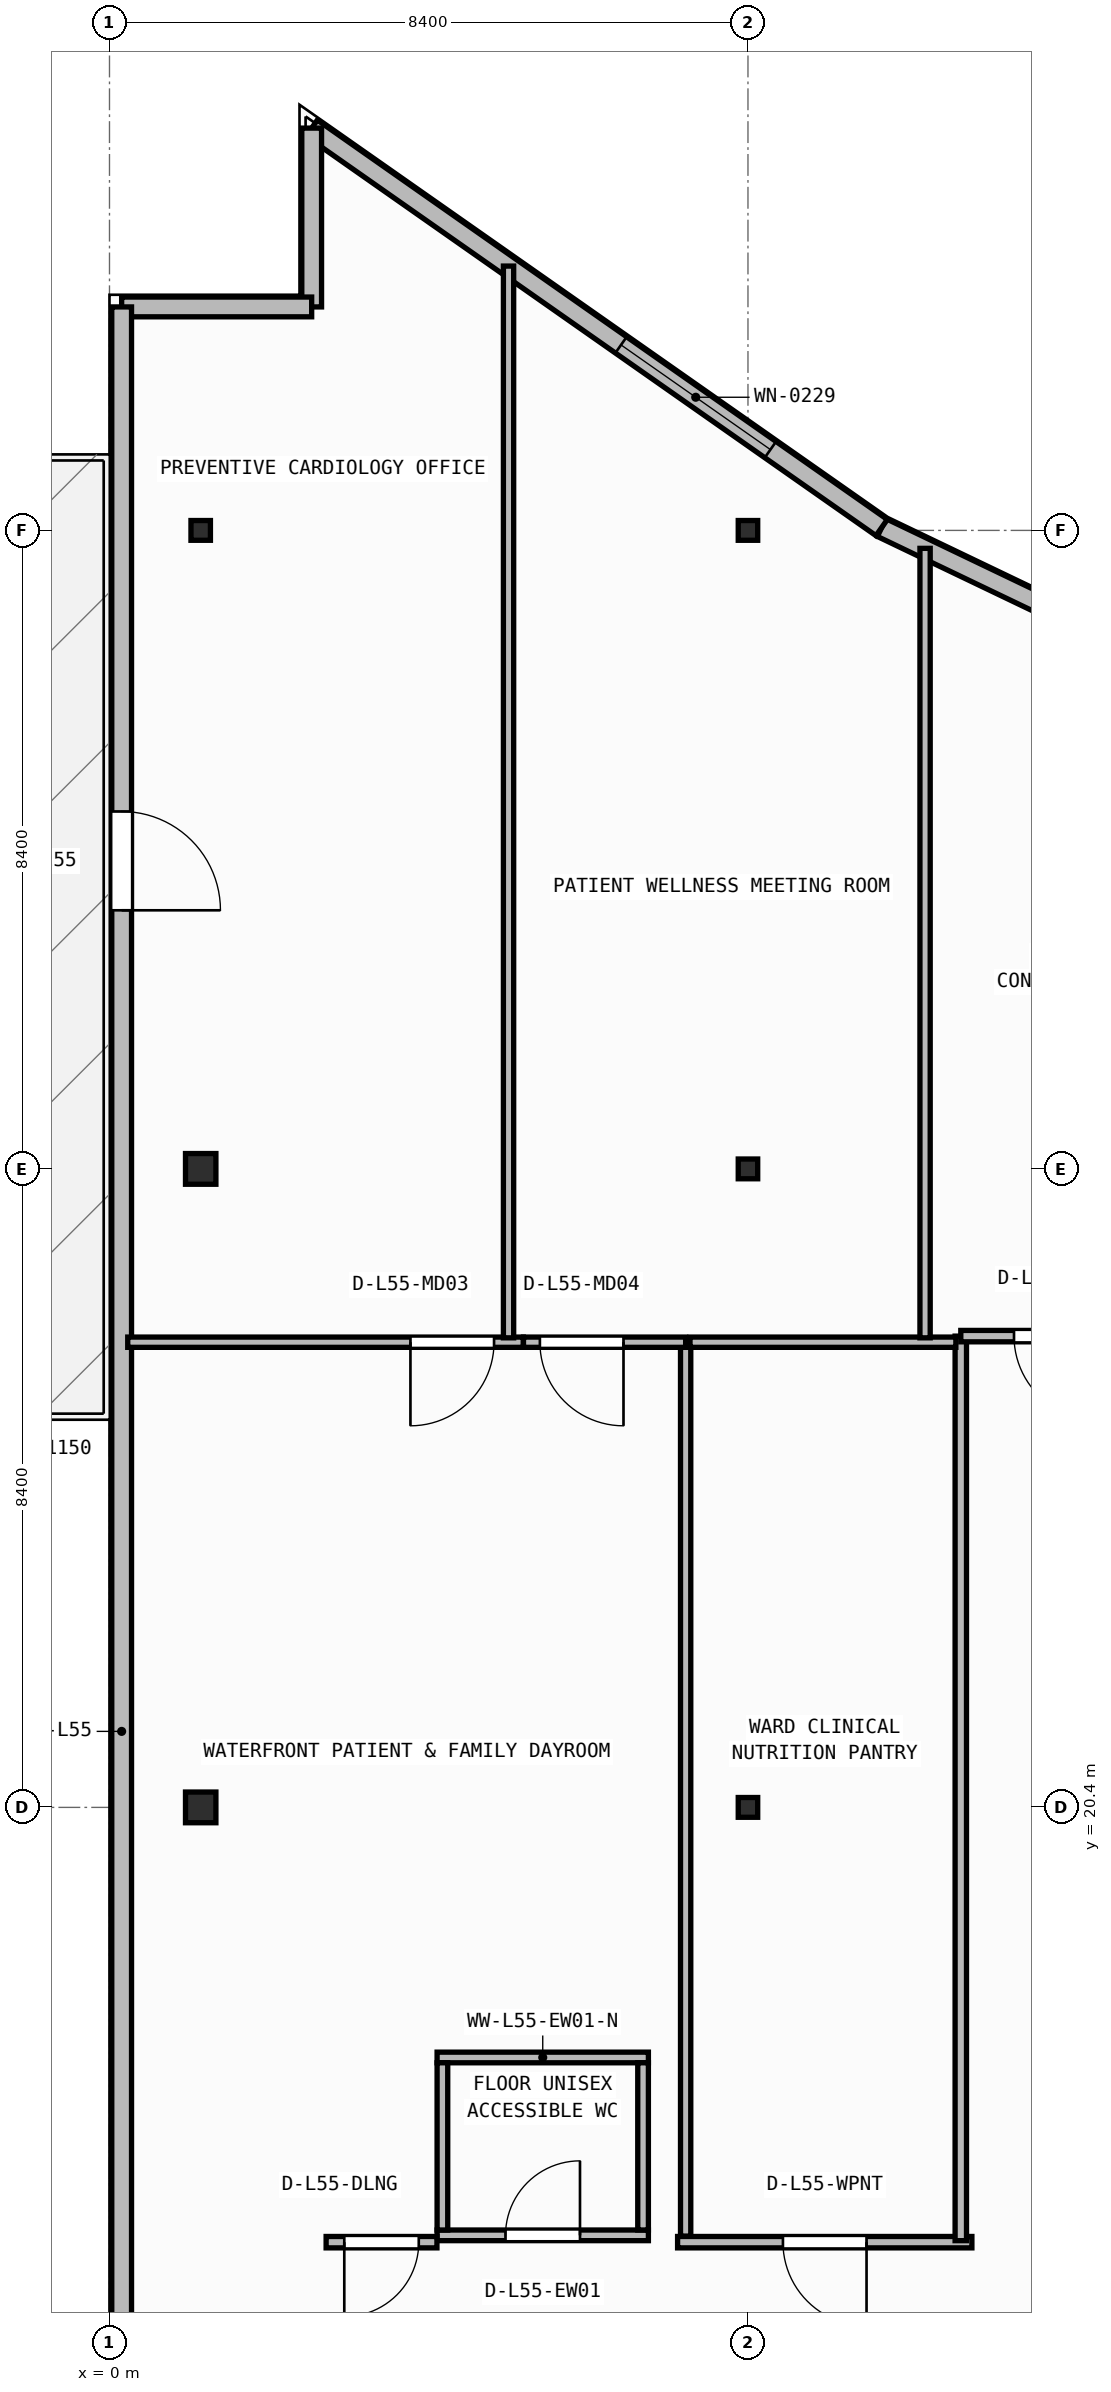
"""IFC4 building model, lengths in metres.
Left out: names, types, materials, properties, quantities, classifications, styles, units other than length and angle.
Written with IfcOpenShell. Run it as: python <this file> out.ifc"""

import sys

from ifc_helpers import new_model, si_unit, direction, frame, frame_2d, origin, origin_2d, place, context, subcontext, project, spatial, rectangle, i_section, extrude, element, fill, save


model = new_model("IFC4")
c1 = context("Model", 3, precision=1e-05, world=origin(), true_north=direction((0.0, 1.0)))
c2 = subcontext(c1, "Body", "Model", "MODEL_VIEW")
j1 = project(units=[si_unit("LENGTHUNIT", "METRE"), si_unit("PLANEANGLEUNIT", "RADIAN")], contexts=[c1])
p1 = place(None, origin())
s1 = spatial("IfcSite", under=j1, at=p1, CompositionType="ELEMENT")
p2 = place(p1, origin())
s2 = spatial("IfcBuilding", under=s1, at=p2, CompositionType="ELEMENT")
p3 = place(p2, frame((0.0, 0.0, 223.7)))
s3 = spatial("IfcBuildingStorey", under=s2, at=p3, CompositionType="ELEMENT", Elevation=223.7)
p4 = place(p3, frame((1.2, 20.4, 0.0), z_axis=(0.0, 0.0, 1.0), x_axis=(1.0, 0.0, 0.0)))
e1 = element("IfcColumn", 1, at=p4, inside=s3, PredefinedType="COLUMN", context=c2, shape_type="SweptSolid", body=[
    extrude(i_section(OverallWidth=0.4, OverallDepth=0.404, WebThickness=0.02, FlangeThickness=0.032, at=origin_2d()), origin(), (0.0, 0.0, 1.0), 3.95),
])
p5 = place(p3, frame((8.4, 20.4, 0.0), z_axis=(0.0, 0.0, 1.0), x_axis=(1.0, 0.0, 0.0)))
e2 = element("IfcColumn", 2, at=p5, inside=s3, PredefinedType="COLUMN", context=c2, shape_type="SweptSolid", body=[
    extrude(i_section(OverallWidth=0.256, OverallDepth=0.26, WebThickness=0.01, FlangeThickness=0.017, FilletRadius=0.013, at=origin_2d()), origin(), (0.0, 0.0, 1.0), 3.95),
])
p6 = place(p3, frame((1.2, 28.8, 0.0), z_axis=(0.0, 0.0, 1.0), x_axis=(1.0, 0.0, 0.0)))
e3 = element("IfcColumn", 3, at=p6, inside=s3, PredefinedType="COLUMN", context=c2, shape_type="SweptSolid", body=[
    extrude(i_section(OverallWidth=0.4, OverallDepth=0.404, WebThickness=0.02, FlangeThickness=0.032, at=origin_2d()), origin(), (0.0, 0.0, 1.0), 3.95),
])
for number, where, z_axis, x_axis in (
    (4, (8.4, 28.8, 0.0), (0.0, 0.0, 1.0), (1.0, 0.0, 0.0)),
    (5, (1.2, 37.2, 0.0), (0.0, 0.0, 1.0), (1.0, 0.0, 0.0)),
    (6, (8.4, 37.2, 0.0), (0.0, 0.0, 1.0), (1.0, 0.0, 0.0)),
):
    element("IfcColumn", number, at=place(p3, frame(where, z_axis=z_axis, x_axis=x_axis)), inside=s3, PredefinedType="COLUMN", context=c2, shape_type="SweptSolid", body=[
        extrude(i_section(OverallWidth=0.256, OverallDepth=0.26, WebThickness=0.01, FlangeThickness=0.017, FilletRadius=0.013, at=origin_2d()), origin(), (0.0, 0.0, 1.0), 3.95),
    ])
p7 = place(p3, frame((21.461, 31.823, 0.0), z_axis=(0.0, 0.0, 1.0), x_axis=(-0.901858094827, 0.432032379336, 0.0)))
e7 = element("IfcWall", 7, at=p7, inside=s3, PredefinedType="STANDARD", context=c2, shape_type="SweptSolid", body=[
    extrude(rectangle(XDim=12.532, YDim=0.26, at=frame_2d((6.266, 0.0))), origin(), (0.0, 0.0, 1.0), 3.71),
])
p8 = place(p7, frame((2.71, 0.0, 0.9)))
e8 = element("IfcOpeningElement", 8, at=p8, cuts=e7, PredefinedType="OPENING", context=c2, shape_type="SweptSolid", body=[
    extrude(rectangle(XDim=2.4, YDim=1.65, at=frame_2d((1.2, 0.825))), frame((0.0, 0.14, 0.0), z_axis=(0.0, -1.0, 0.0), x_axis=(1.0, 0.0, 0.0)), (0.0, 0.0, 1.0), 0.28),
])
p9 = place(p3, frame((10.159, 37.237, 0.0), z_axis=(0.0, 0.0, 1.0), x_axis=(-0.818933702389, 0.57388813465, 0.0)))
e9 = element("IfcWall", 9, at=p9, inside=s3, PredefinedType="STANDARD", context=c2, shape_type="SweptSolid", body=[
    extrude(rectangle(XDim=9.157, YDim=0.26, at=frame_2d((4.579, 0.0))), origin(), (0.0, 0.0, 1.0), 3.71),
])
p10 = place(p9, frame((1.787, 0.0, 0.9)))
e10 = element("IfcOpeningElement", 10, at=p10, cuts=e9, PredefinedType="OPENING", context=c2, shape_type="SweptSolid", body=[
    extrude(rectangle(XDim=2.4, YDim=1.65, at=frame_2d((1.2, 0.825))), frame((0.0, 0.14, 0.0), z_axis=(0.0, -1.0, 0.0), x_axis=(1.0, 0.0, 0.0)), (0.0, 0.0, 1.0), 0.28),
])
p11 = place(p3, frame((2.66, 42.492, 0.0), z_axis=(0.0, 0.0, 1.0), x_axis=(0.0, -1.0, 0.0)))
e11 = element("IfcWall", 11, at=p11, inside=s3, PredefinedType="STANDARD", context=c2, shape_type="SweptSolid", body=[
    extrude(rectangle(XDim=2.353, YDim=0.26, at=frame_2d((1.176, 0.0))), origin(), (0.0, 0.0, 1.0), 3.71),
])
p12 = place(p3, frame((2.66, 40.14, 0.0), z_axis=(0.0, 0.0, 1.0), x_axis=(-1.0, 0.0, 0.0)))
e12 = element("IfcWall", 12, at=p12, inside=s3, PredefinedType="STANDARD", context=c2, shape_type="SweptSolid", body=[
    extrude(rectangle(XDim=2.5, YDim=0.26, at=frame_2d((1.25, 0.0))), origin(), (0.0, 0.0, 1.0), 3.71),
])
p13 = place(p3, frame((0.16, 40.14, 0.0), z_axis=(0.0, 0.0, 1.0), x_axis=(0.0, -1.0, 0.0)))
e13 = element("IfcWall", 13, at=p13, inside=s3, PredefinedType="STANDARD", context=c2, shape_type="SweptSolid", body=[
    extrude(rectangle(XDim=37.48, YDim=0.26, at=frame_2d((18.74, 0.0))), origin(), (0.0, 0.0, 1.0), 3.71),
])
p14 = place(p13, frame((6.638, 0.0, 0.0)))
e14 = element("IfcOpeningElement", 14, at=p14, cuts=e13, PredefinedType="OPENING", context=c2, shape_type="SweptSolid", body=[
    extrude(rectangle(XDim=1.3, YDim=2.15, at=frame_2d((0.65, 1.075))), frame((0.0, 0.14, 0.0), z_axis=(0.0, -1.0, 0.0), x_axis=(1.0, 0.0, 0.0)), (0.0, 0.0, 1.0), 0.28),
])
p15 = place(p3, frame((4.31, 14.77, 0.0), z_axis=(0.0, 0.0, 1.0), x_axis=(1.0, 0.0, 0.0)))
e15 = element("IfcWall", 15, at=p15, inside=s3, PredefinedType="PARTITIONING", context=c2, shape_type="SweptSolid", body=[
    extrude(rectangle(XDim=2.78, YDim=0.14, at=frame_2d((1.39, 0.0))), origin(), (0.0, 0.0, 1.0), 3.71),
])
p16 = place(p15, frame((0.9, 0.0, 0.0)))
e16 = element("IfcOpeningElement", 16, at=p16, cuts=e15, PredefinedType="OPENING", context=c2, shape_type="SweptSolid", body=[
    extrude(rectangle(XDim=0.98, YDim=2.1, at=frame_2d((0.49, 1.05))), frame((0.0, 0.08, 0.0), z_axis=(0.0, -1.0, 0.0), x_axis=(1.0, 0.0, 0.0)), (0.0, 0.0, 1.0), 0.16),
])
p17 = place(p3, frame((4.31, 17.11, 0.0), z_axis=(0.0, 0.0, 1.0), x_axis=(1.0, 0.0, 0.0)))
e17 = element("IfcWall", 17, at=p17, inside=s3, PredefinedType="PARTITIONING", context=c2, shape_type="SweptSolid", body=[
    extrude(rectangle(XDim=2.78, YDim=0.14, at=frame_2d((1.39, 0.0))), origin(), (0.0, 0.0, 1.0), 3.71),
])
for number, where, z_axis, x_axis in (
    (18, (4.38, 14.84, 0.0), (0.0, 0.0, 1.0), (0.0, 1.0, 0.0)),
    (19, (7.02, 14.84, 0.0), (0.0, 0.0, 1.0), (0.0, 1.0, 0.0)),
):
    element("IfcWall", number, at=place(p3, frame(where, z_axis=z_axis, x_axis=x_axis)), inside=s3, PredefinedType="PARTITIONING", context=c2, shape_type="SweptSolid", body=[
        extrude(rectangle(XDim=2.2, YDim=0.14, at=frame_2d((1.1, 0.0))), origin(), (0.0, 0.0, 1.0), 3.71),
    ])
p18 = place(p3, frame((4.308, 14.68, 0.0), z_axis=(0.0, 0.0, 1.0), x_axis=(-1.0, 0.0, 0.0)))
e20 = element("IfcWall", 20, at=p18, inside=s3, PredefinedType="PARTITIONING", context=c2, shape_type="SweptSolid", body=[
    extrude(rectangle(XDim=1.458, YDim=0.15, at=frame_2d((0.729, 0.0))), origin(), (0.0, 0.0, 1.0), 3.71),
])
p19 = place(p18, frame((0.239, 0.0, 0.0)))
e21 = element("IfcOpeningElement", 21, at=p19, cuts=e20, PredefinedType="OPENING", context=c2, shape_type="SweptSolid", body=[
    extrude(rectangle(XDim=0.98, YDim=2.1, at=frame_2d((0.49, 1.05))), frame((0.0, 0.085, 0.0), z_axis=(0.0, -1.0, 0.0), x_axis=(1.0, 0.0, 0.0)), (0.0, 0.0, 1.0), 0.17),
])
p20 = place(p3, frame((11.346, 14.68, 0.0), z_axis=(0.0, 0.0, 1.0), x_axis=(-1.0, 0.0, 0.0)))
e22 = element("IfcWall", 22, at=p20, inside=s3, PredefinedType="PARTITIONING", context=c2, shape_type="SweptSolid", body=[
    extrude(rectangle(XDim=3.872, YDim=0.15, at=frame_2d((1.936, 0.0))), origin(), (0.0, 0.0, 1.0), 3.71),
])
p21 = place(p20, frame((1.386, 0.0, 0.0)))
e23 = element("IfcOpeningElement", 23, at=p21, cuts=e22, PredefinedType="OPENING", context=c2, shape_type="SweptSolid", body=[
    extrude(rectangle(XDim=1.1, YDim=2.1, at=frame_2d((0.55, 1.05))), frame((0.0, 0.085, 0.0), z_axis=(0.0, -1.0, 0.0), x_axis=(1.0, 0.0, 0.0)), (0.0, 0.0, 1.0), 0.17),
])
p22 = place(p3, frame((11.2, 26.6, 0.0), z_axis=(0.0, 0.0, 1.0), x_axis=(0.0, -1.0, 0.0)))
e24 = element("IfcWall", 24, at=p22, inside=s3, PredefinedType="PARTITIONING", context=c2, shape_type="SweptSolid", body=[
    extrude(rectangle(XDim=11.9, YDim=0.15, at=frame_2d((5.95, 0.0))), origin(), (0.0, 0.0, 1.0), 3.71),
])
p23 = place(p3, frame((13.7, 26.6, 0.0), z_axis=(0.0, 0.0, 1.0), x_axis=(-1.0, 0.0, 0.0)))
e25 = element("IfcWall", 25, at=p23, inside=s3, PredefinedType="PARTITIONING", context=c2, shape_type="SweptSolid", body=[
    extrude(rectangle(XDim=2.5, YDim=0.15, at=frame_2d((1.25, 0.0))), origin(), (0.0, 0.0, 1.0), 3.71),
])
p24 = place(p23, frame((0.7, 0.0, 0.0)))
e26 = element("IfcOpeningElement", 26, at=p24, cuts=e25, PredefinedType="OPENING", context=c2, shape_type="SweptSolid", body=[
    extrude(rectangle(XDim=1.1, YDim=2.1, at=frame_2d((0.55, 1.05))), frame((0.0, 0.085, 0.0), z_axis=(0.0, -1.0, 0.0), x_axis=(1.0, 0.0, 0.0)), (0.0, 0.0, 1.0), 0.17),
])
p25 = place(p3, frame((7.58, 14.76, 0.0), z_axis=(0.0, 0.0, 1.0), x_axis=(0.0, 1.0, 0.0)))
e27 = element("IfcWall", 27, at=p25, inside=s3, PredefinedType="PARTITIONING", context=c2, shape_type="SweptSolid", body=[
    extrude(rectangle(XDim=11.76, YDim=0.135, at=frame_2d((5.88, 0.0))), origin(), (0.0, 0.0, 1.0), 3.71),
])
p26 = place(p3, frame((5.445, 26.52, 0.0), z_axis=(0.0, 0.0, 1.0), x_axis=(-1.0, 0.0, 0.0)))
e28 = element("IfcWall", 28, at=p26, inside=s3, PredefinedType="PARTITIONING", context=c2, shape_type="SweptSolid", body=[
    extrude(rectangle(XDim=5.205, YDim=0.135, at=frame_2d((2.602, 0.0))), origin(), (0.0, 0.0, 1.0), 3.71),
])
p27 = place(p26, frame((0.385, 0.0, 0.0)))
e29 = element("IfcOpeningElement", 29, at=p27, cuts=e28, PredefinedType="OPENING", context=c2, shape_type="SweptSolid", body=[
    extrude(rectangle(XDim=1.1, YDim=2.1, at=frame_2d((0.55, 1.05))), frame((0.0, 0.077, 0.0), z_axis=(0.0, -1.0, 0.0), x_axis=(1.0, 0.0, 0.0)), (0.0, 0.0, 1.0), 0.155),
])
p28 = place(p3, frame((7.58, 26.52, 0.0), z_axis=(0.0, 0.0, 1.0), x_axis=(-1.0, 0.0, 0.0)))
e30 = element("IfcWall", 30, at=p28, inside=s3, PredefinedType="PARTITIONING", context=c2, shape_type="SweptSolid", body=[
    extrude(rectangle(XDim=2.134, YDim=0.135, at=frame_2d((1.067, 0.0))), origin(), (0.0, 0.0, 1.0), 3.71),
])
p29 = place(p28, frame((0.818, 0.0, 0.0)))
e31 = element("IfcOpeningElement", 31, at=p29, cuts=e30, PredefinedType="OPENING", context=c2, shape_type="SweptSolid", body=[
    extrude(rectangle(XDim=1.1, YDim=2.1, at=frame_2d((0.55, 1.05))), frame((0.0, 0.077, 0.0), z_axis=(0.0, -1.0, 0.0), x_axis=(1.0, 0.0, 0.0)), (0.0, 0.0, 1.0), 0.155),
])
p30 = place(p3, frame((11.135, 26.52, 0.0), z_axis=(0.0, 0.0, 1.0), x_axis=(-1.0, 0.0, 0.0)))
e32 = element("IfcWall", 32, at=p30, inside=s3, PredefinedType="PARTITIONING", context=c2, shape_type="SweptSolid", body=[
    extrude(rectangle(XDim=3.498, YDim=0.135, at=frame_2d((1.749, 0.0))), origin(), (0.0, 0.0, 1.0), 3.71),
])
p31 = place(p3, frame((5.25, 26.577, 0.0), z_axis=(0.0, 0.0, 1.0), x_axis=(0.0, 1.0, 0.0)))
e33 = element("IfcWall", 33, at=p31, inside=s3, PredefinedType="PARTITIONING", context=c2, shape_type="SweptSolid", body=[
    extrude(rectangle(XDim=14.1, YDim=0.135, at=frame_2d((7.05, 0.0))), origin(), (0.0, 0.0, 1.0), 3.71),
])
p32 = place(p3, frame((10.73, 26.577, 0.0), z_axis=(0.0, 0.0, 1.0), x_axis=(0.0, 1.0, 0.0)))
e34 = element("IfcWall", 34, at=p32, inside=s3, PredefinedType="PARTITIONING", context=c2, shape_type="SweptSolid", body=[
    extrude(rectangle(XDim=10.386, YDim=0.135, at=frame_2d((5.193, 0.0))), origin(), (0.0, 0.0, 1.0), 3.71),
])
p33 = place(p10, origin())
e35 = element("IfcWindow", 35, at=p33, inside=s3, PartitioningType="SINGLE_PANEL", PredefinedType="WINDOW", context=c2, shape_type="SweptSolid", body=[
    extrude(rectangle(XDim=2.4, YDim=1.65, at=frame_2d((1.2, 0.825))), frame((0.0, 0.03, 0.0), z_axis=(0.0, -1.0, 0.0), x_axis=(1.0, 0.0, 0.0)), (0.0, 0.0, 1.0), 0.06),
])
fill(e10, e35)
p34 = place(p14, origin())
e36 = element("IfcDoor", 36, at=p34, inside=s3, OperationType="SINGLE_SWING_RIGHT", PredefinedType="DOOR", context=c2, shape_type="SweptSolid", body=[
    extrude(rectangle(XDim=1.3, YDim=2.15, at=frame_2d((0.65, 1.075))), frame((0.0, 0.025, 0.0), z_axis=(0.0, -1.0, 0.0), x_axis=(1.0, 0.0, 0.0)), (0.0, 0.0, 1.0), 0.05),
])
fill(e14, e36)
p35 = place(p16, origin())
e37 = element("IfcDoor", 37, at=p35, inside=s3, OperationType="SINGLE_SWING_RIGHT", PredefinedType="DOOR", context=c2, shape_type="SweptSolid", body=[
    extrude(rectangle(XDim=0.98, YDim=2.1, at=frame_2d((0.49, 1.05))), frame((0.0, 0.025, 0.0), z_axis=(0.0, -1.0, 0.0), x_axis=(1.0, 0.0, 0.0)), (0.0, 0.0, 1.0), 0.05),
])
fill(e16, e37)
p36 = place(p19, origin())
e38 = element("IfcDoor", 38, at=p36, inside=s3, OperationType="SINGLE_SWING_RIGHT", PredefinedType="DOOR", context=c2, shape_type="SweptSolid", body=[
    extrude(rectangle(XDim=0.98, YDim=2.1, at=frame_2d((0.49, 1.05))), frame((0.0, 0.025, 0.0), z_axis=(0.0, -1.0, 0.0), x_axis=(1.0, 0.0, 0.0)), (0.0, 0.0, 1.0), 0.05),
])
fill(e21, e38)
p37 = place(p21, origin())
e39 = element("IfcDoor", 39, at=p37, inside=s3, OperationType="SINGLE_SWING_LEFT", PredefinedType="DOOR", context=c2, shape_type="SweptSolid", body=[
    extrude(rectangle(XDim=1.1, YDim=2.1, at=frame_2d((0.55, 1.05))), frame((0.0, 0.025, 0.0), z_axis=(0.0, -1.0, 0.0), x_axis=(1.0, 0.0, 0.0)), (0.0, 0.0, 1.0), 0.05),
])
fill(e23, e39)
p38 = place(p24, origin())
e40 = element("IfcDoor", 40, at=p38, inside=s3, OperationType="SINGLE_SWING_LEFT", PredefinedType="DOOR", context=c2, shape_type="SweptSolid", body=[
    extrude(rectangle(XDim=1.1, YDim=2.1, at=frame_2d((0.55, 1.05))), frame((0.0, 0.025, 0.0), z_axis=(0.0, -1.0, 0.0), x_axis=(1.0, 0.0, 0.0)), (0.0, 0.0, 1.0), 0.05),
])
fill(e26, e40)
p39 = place(p27, origin())
e41 = element("IfcDoor", 41, at=p39, inside=s3, OperationType="SINGLE_SWING_RIGHT", PredefinedType="DOOR", context=c2, shape_type="SweptSolid", body=[
    extrude(rectangle(XDim=1.1, YDim=2.1, at=frame_2d((0.55, 1.05))), frame((0.0, 0.025, 0.0), z_axis=(0.0, -1.0, 0.0), x_axis=(1.0, 0.0, 0.0)), (0.0, 0.0, 1.0), 0.05),
])
fill(e29, e41)
p40 = place(p29, origin())
e42 = element("IfcDoor", 42, at=p40, inside=s3, OperationType="SINGLE_SWING_LEFT", PredefinedType="DOOR", context=c2, shape_type="SweptSolid", body=[
    extrude(rectangle(XDim=1.1, YDim=2.1, at=frame_2d((0.55, 1.05))), frame((0.0, 0.025, 0.0), z_axis=(0.0, -1.0, 0.0), x_axis=(1.0, 0.0, 0.0)), (0.0, 0.0, 1.0), 0.05),
])
fill(e31, e42)
save(model, sys.argv[1])
